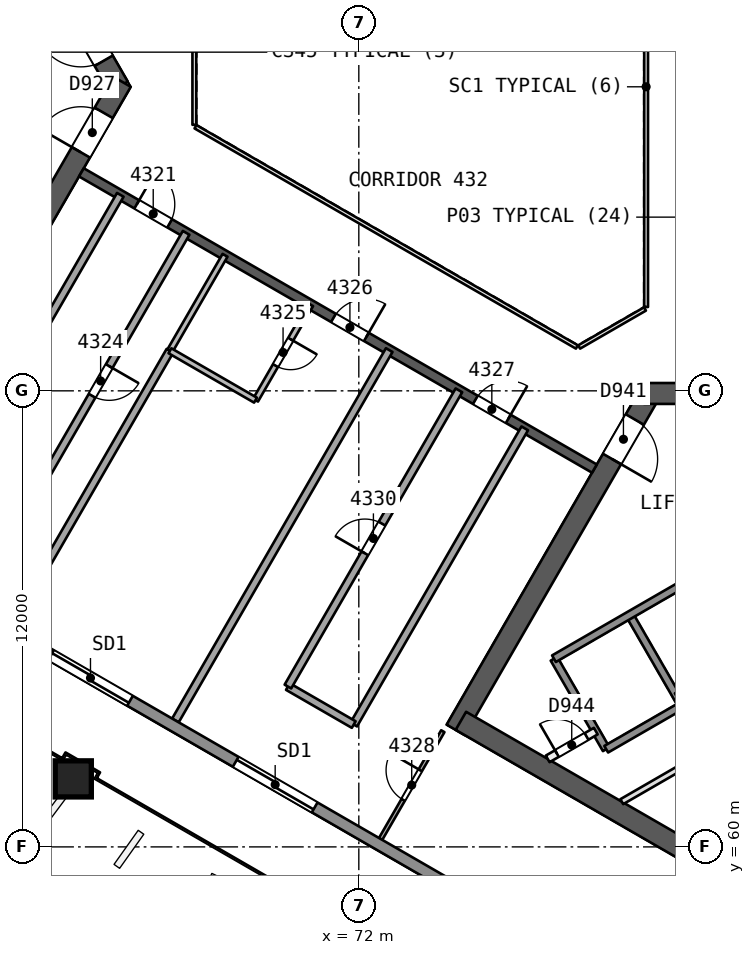
"""IFC4 building model, lengths in metres.
Left out: names, types, materials, properties, quantities, classifications, styles, units other than length and angle.
Written with IfcOpenShell. Run it as: python <this file> out.ifc"""

import sys

from ifc_helpers import new_model, si_unit, direction, frame, frame_2d, origin, origin_2d, place, context, subcontext, project, spatial, rectangle, extrude, element, fill, save


model = new_model("IFC4")
c1 = context("Model", 3, precision=1e-05, world=origin(), true_north=direction((0.0, 1.0)))
c2 = subcontext(c1, "Body", "Model", "MODEL_VIEW")
j1 = project(units=[si_unit("LENGTHUNIT", "METRE"), si_unit("PLANEANGLEUNIT", "RADIAN")], contexts=[c1])
p1 = place(None, origin())
s1 = spatial("IfcSite", under=j1, at=p1, CompositionType="ELEMENT")
p2 = place(p1, origin())
s2 = spatial("IfcBuilding", under=s1, at=p2, CompositionType="ELEMENT")
p3 = place(p2, frame((0.0, 0.0, 178.5)))
s3 = spatial("IfcBuildingStorey", under=s2, at=p3, CompositionType="ELEMENT", Elevation=178.5)
p4 = place(p3, frame((65.682, 80.0, 0.0), z_axis=(0.0, 0.0, 1.0), x_axis=(-0.500000202252, 0.866025287014, 0.0)))
e1 = element("IfcWall", 1, at=p4, inside=s3, PredefinedType="SHEAR", context=c2, shape_type="SweptSolid", body=[
    extrude(rectangle(XDim=10.221, YDim=0.55, at=frame_2d((5.111, 0.0))), origin(), (0.0, 0.0, 1.0), 3.7),
])
p5 = place(p4, frame((0.791, 0.0, 0.0)))
e2 = element("IfcOpeningElement", 2, at=p5, cuts=e1, PredefinedType="OPENING", context=c2, shape_type="SweptSolid", body=[
    extrude(rectangle(XDim=1.2, YDim=2.1, at=frame_2d((0.6, 1.05))), frame((0.0, 0.286, 0.0), z_axis=(0.0, -1.0, 0.0), x_axis=(1.0, 0.0, 0.0)), (0.0, 0.0, 1.0), 0.571),
])
p6 = place(p3, frame((60.709, 71.386, 0.0), z_axis=(0.0, 0.0, 1.0), x_axis=(0.500015938302, 0.866016201606, 0.0)))
e3 = element("IfcWall", 3, at=p6, inside=s3, PredefinedType="SHEAR", context=c2, shape_type="SweptSolid", body=[
    extrude(rectangle(XDim=10.105, YDim=0.55, at=frame_2d((5.053, 0.0))), origin(), (0.0, 0.0, 1.0), 3.7),
])
p7 = place(p6, frame((7.955, 0.0, 0.0)))
e4 = element("IfcOpeningElement", 4, at=p7, cuts=e3, PredefinedType="OPENING", context=c2, shape_type="SweptSolid", body=[
    extrude(rectangle(XDim=1.2, YDim=2.1, at=frame_2d((0.6, 1.05))), frame((0.0, 0.286, 0.0), z_axis=(0.0, -1.0, 0.0), x_axis=(1.0, 0.0, 0.0)), (0.0, 0.0, 1.0), 0.571),
])
p8 = place(p3, frame((79.659, 71.931, 0.0), z_axis=(0.0, 0.0, 1.0), x_axis=(-0.500000202252, -0.866025287014, 0.0)))
e5 = element("IfcWall", 5, at=p8, inside=s3, PredefinedType="SHEAR", context=c2, shape_type="SweptSolid", body=[
    extrude(rectangle(XDim=10.221, YDim=0.55, at=frame_2d((5.111, 0.0))), origin(), (0.0, 0.0, 1.0), 3.7),
])
p9 = place(p8, frame((0.791, 0.0, 0.0)))
e6 = element("IfcOpeningElement", 6, at=p9, cuts=e5, PredefinedType="OPENING", context=c2, shape_type="SweptSolid", body=[
    extrude(rectangle(XDim=1.2, YDim=2.1, at=frame_2d((0.6, 1.05))), frame((0.0, 0.286, 0.0), z_axis=(0.0, -1.0, 0.0), x_axis=(1.0, 0.0, 0.0)), (0.0, 0.0, 1.0), 0.571),
])
p10 = place(p3, frame((74.686, 63.317, 0.0), z_axis=(0.0, 0.0, 1.0), x_axis=(0.866024505738, -0.500001555459, 0.0)))
e7 = element("IfcWall", 7, at=p10, inside=s3, PredefinedType="SHEAR", context=c2, shape_type="SweptSolid", body=[
    extrude(rectangle(XDim=14.059, YDim=0.55, at=frame_2d((7.029, 0.0))), origin(), (0.0, 0.0, 1.0), 3.7),
])
p11 = place(p3, frame((89.605, 71.931, 0.0), z_axis=(0.0, 0.0, 1.0), x_axis=(-1.0, 0.0, 0.0)))
e8 = element("IfcWall", 8, at=p11, inside=s3, PredefinedType="SHEAR", context=c2, shape_type="SweptSolid", body=[
    extrude(rectangle(XDim=10.105, YDim=0.55, at=frame_2d((5.052, 0.0))), origin(), (0.0, 0.0, 1.0), 3.7),
])
p12 = place(p11, frame((7.955, 0.0, 0.0)))
e9 = element("IfcOpeningElement", 9, at=p12, cuts=e8, PredefinedType="OPENING", context=c2, shape_type="SweptSolid", body=[
    extrude(rectangle(XDim=1.2, YDim=2.1, at=frame_2d((0.6, 1.05))), frame((0.0, 0.286, 0.0), z_axis=(0.0, -1.0, 0.0), x_axis=(1.0, 0.0, 0.0)), (0.0, 0.0, 1.0), 0.571),
])
p13 = place(p3, frame((64.7, 77.748, 0.0), z_axis=(0.0, 0.0, 1.0), x_axis=(0.866026492143, -0.499998114903, 0.0)))
e10 = element("IfcWall", 10, at=p13, inside=s3, PredefinedType="SHEAR", context=c2, shape_type="SweptSolid", body=[
    extrude(rectangle(XDim=15.588, YDim=0.25, at=frame_2d((7.794, 0.0))), origin(), (0.0, 0.0, 1.0), 3.25),
])
p14 = place(p13, frame((1.682, 0.0, 0.0)))
e11 = element("IfcOpeningElement", 11, at=p14, cuts=e10, PredefinedType="OPENING", context=c2, shape_type="SweptSolid", body=[
    extrude(rectangle(XDim=1.0, YDim=2.1, at=frame_2d((0.5, 1.05))), frame((0.0, 0.135, 0.0), z_axis=(0.0, -1.0, 0.0), x_axis=(1.0, 0.0, 0.0)), (0.0, 0.0, 1.0), 0.271),
])
p15 = place(p13, frame((7.659, 0.0, 0.0)))
e12 = element("IfcOpeningElement", 12, at=p15, cuts=e10, PredefinedType="OPENING", context=c2, shape_type="SweptSolid", body=[
    extrude(rectangle(XDim=1.0, YDim=2.1, at=frame_2d((0.5, 1.05))), frame((0.0, 0.135, 0.0), z_axis=(0.0, -1.0, 0.0), x_axis=(1.0, 0.0, 0.0)), (0.0, 0.0, 1.0), 0.271),
])
p16 = place(p13, frame((11.971, 0.0, 0.0)))
e13 = element("IfcOpeningElement", 13, at=p16, cuts=e10, PredefinedType="OPENING", context=c2, shape_type="SweptSolid", body=[
    extrude(rectangle(XDim=1.0, YDim=2.1, at=frame_2d((0.5, 1.05))), frame((0.0, 0.135, 0.0), z_axis=(0.0, -1.0, 0.0), x_axis=(1.0, 0.0, 0.0)), (0.0, 0.0, 1.0), 0.271),
])
p17 = place(p3, frame((64.474, 61.769, 0.0), z_axis=(0.010093620709, 0.017482414954, 0.999796221231), x_axis=(-0.866025993948, 0.499998977805, 1.48331e-07)))
e14 = element("IfcColumn", 14, at=p17, inside=s3, PredefinedType="COLUMN", context=c2, shape_type="SweptSolid", body=[
    extrude(rectangle(XDim=0.95, YDim=0.95, at=origin_2d()), origin(), (0.0, 0.0, 1.0), 3.701),
])
p18 = place(p3, frame((67.456, 76.157, 0.0), z_axis=(0.0, 0.0, 1.0), x_axis=(-0.499990139034, -0.866031096941, 0.0)))
e15 = element("IfcWall", 15, at=p18, inside=s3, PredefinedType="PARTITIONING", context=c2, shape_type="SweptSolid", body=[
    extrude(rectangle(XDim=9.0, YDim=0.2, at=frame_2d((4.5, 0.0))), origin(), (0.0, 0.0, 1.0), 3.25),
])
p19 = place(p18, frame((4.05, 0.0, 0.0)))
e16 = element("IfcOpeningElement", 16, at=p19, cuts=e15, PredefinedType="OPENING", context=c2, shape_type="SweptSolid", body=[
    extrude(rectangle(XDim=0.9, YDim=2.1, at=frame_2d((0.45, 1.05))), frame((0.0, 0.11, 0.0), z_axis=(0.0, -1.0, 0.0), x_axis=(1.0, 0.0, 0.0)), (0.0, 0.0, 1.0), 0.221),
])
p20 = place(p3, frame((61.224, 69.363, 0.0), z_axis=(0.0, 0.0, 1.0), x_axis=(0.499990139034, 0.866031096941, 0.0)))
e17 = element("IfcWall", 17, at=p20, inside=s3, PredefinedType="PARTITIONING", context=c2, shape_type="SweptSolid", body=[
    extrude(rectangle(XDim=9.0, YDim=0.2, at=frame_2d((4.5, 0.0))), origin(), (0.0, 0.0, 1.0), 3.25),
])
p21 = place(p3, frame((62.854, 65.821, 0.0), z_axis=(0.0, 0.0, 1.0), x_axis=(0.500002444709, 0.866023992326, 0.0)))
e18 = element("IfcWall", 18, at=p21, inside=s3, PredefinedType="PARTITIONING", context=c2, shape_type="SweptSolid", body=[
    extrude(rectangle(XDim=8.353, YDim=0.2, at=frame_2d((4.177, 0.0))), origin(), (0.0, 0.0, 1.0), 3.25),
])
p22 = place(p3, frame((67.03, 73.054, 0.0), z_axis=(0.0, 0.0, 1.0), x_axis=(0.499987231761, 0.866032775405, 0.0)))
e19 = element("IfcWall", 19, at=p22, inside=s3, PredefinedType="PARTITIONING", context=c2, shape_type="SweptSolid", body=[
    extrude(rectangle(XDim=2.9, YDim=0.15, at=frame_2d((1.45, 0.0))), origin(), (0.0, 0.0, 1.0), 3.25),
])
p23 = place(p3, frame((70.732, 74.266, 0.0), z_axis=(0.0, 0.0, 1.0), x_axis=(-0.499987231761, -0.866032775405, 0.0)))
e20 = element("IfcWall", 20, at=p23, inside=s3, PredefinedType="PARTITIONING", context=c2, shape_type="SweptSolid", body=[
    extrude(rectangle(XDim=2.9, YDim=0.15, at=frame_2d((1.45, 0.0))), origin(), (0.0, 0.0, 1.0), 3.25),
])
p24 = place(p23, frame((1.05, 0.0, 0.0)))
e21 = element("IfcOpeningElement", 21, at=p24, cuts=e20, PredefinedType="OPENING", context=c2, shape_type="SweptSolid", body=[
    extrude(rectangle(XDim=0.8, YDim=2.1, at=frame_2d((0.4, 1.05))), frame((0.0, 0.085, 0.0), z_axis=(0.0, -1.0, 0.0), x_axis=(1.0, 0.0, 0.0)), (0.0, 0.0, 1.0), 0.171),
])
p25 = place(p3, frame((69.282, 71.754, 0.0), z_axis=(0.0, 0.0, 1.0), x_axis=(-0.866021400173, 0.500006934395, 0.0)))
e22 = element("IfcWall", 22, at=p25, inside=s3, PredefinedType="PARTITIONING", context=c2, shape_type="SweptSolid", body=[
    extrude(rectangle(XDim=2.6, YDim=0.15, at=frame_2d((1.3, 0.0))), origin(), (0.0, 0.0, 1.0), 3.25),
])
p26 = place(p3, frame((67.174, 63.326, 0.0), z_axis=(0.0, 0.0, 1.0), x_axis=(0.499998524228, 0.86602625582, 0.0)))
e23 = element("IfcWall", 23, at=p26, inside=s3, PredefinedType="PARTITIONING", context=c2, shape_type="SweptSolid", body=[
    extrude(rectangle(XDim=11.253, YDim=0.2, at=frame_2d((5.626, 0.0))), origin(), (0.0, 0.0, 1.0), 3.25),
])
p27 = place(p3, frame((72.573, 60.209, 0.0), z_axis=(0.0, 0.0, 1.0), x_axis=(0.499980647919, 0.866036576425, 0.0)))
e24 = element("IfcWall", 24, at=p27, inside=s3, PredefinedType="PARTITIONING", context=c2, shape_type="SweptSolid", body=[
    extrude(rectangle(XDim=3.274, YDim=0.1, at=frame_2d((1.637, 0.0))), origin(), (0.0, 0.0, 1.0), 3.25),
])
p28 = place(p27, frame((1.187, 0.0, 0.0)))
e25 = element("IfcOpeningElement", 25, at=p28, cuts=e24, PredefinedType="OPENING", context=c2, shape_type="SweptSolid", body=[
    extrude(rectangle(XDim=0.9, YDim=2.1, at=frame_2d((0.45, 1.05))), frame((0.0, 0.061, 0.0), z_axis=(0.0, -1.0, 0.0), x_axis=(1.0, 0.0, 0.0)), (0.0, 0.0, 1.0), 0.121),
])
p29 = place(p3, frame((76.366, 71.013, 0.0), z_axis=(0.0, 0.0, 1.0), x_axis=(-0.5000018851, -0.866024315419, 0.0)))
e26 = element("IfcWall", 26, at=p29, inside=s3, PredefinedType="PARTITIONING", context=c2, shape_type="SweptSolid", body=[
    extrude(rectangle(XDim=9.0, YDim=0.2, at=frame_2d((4.5, 0.0))), origin(), (0.0, 0.0, 1.0), 3.25),
])
p30 = place(p3, frame((71.866, 63.219, 0.0), z_axis=(0.0, 0.0, 1.0), x_axis=(-0.866010750942, 0.50002537861, 0.0)))
e27 = element("IfcWall", 27, at=p30, inside=s3, PredefinedType="PARTITIONING", context=c2, shape_type="SweptSolid", body=[
    extrude(rectangle(XDim=2.0, YDim=0.2, at=frame_2d((1.0, 0.0))), origin(), (0.0, 0.0, 1.0), 3.25),
])
p31 = place(p3, frame((70.134, 64.219, 0.0), z_axis=(0.0, 0.0, 1.0), x_axis=(0.5000018851, 0.866024315419, 0.0)))
e28 = element("IfcWall", 28, at=p31, inside=s3, PredefinedType="PARTITIONING", context=c2, shape_type="SweptSolid", body=[
    extrude(rectangle(XDim=9.0, YDim=0.2, at=frame_2d((4.5, 0.0))), origin(), (0.0, 0.0, 1.0), 3.25),
])
p32 = place(p31, frame((4.05, 0.0, 0.0)))
e29 = element("IfcOpeningElement", 29, at=p32, cuts=e28, PredefinedType="OPENING", context=c2, shape_type="SweptSolid", body=[
    extrude(rectangle(XDim=0.9, YDim=2.1, at=frame_2d((0.45, 1.05))), frame((0.0, 0.11, 0.0), z_axis=(0.0, -1.0, 0.0), x_axis=(1.0, 0.0, 0.0)), (0.0, 0.0, 1.0), 0.221),
])
p33 = place(p3, frame((88.788, 50.676, 0.0), z_axis=(0.0, 0.0, 1.0), x_axis=(-0.866026647012, 0.499997846661, 0.0)))
e30 = element("IfcWall", 30, at=p33, inside=s3, PredefinedType="SOLIDWALL", context=c2, shape_type="SweptSolid", body=[
    extrude(rectangle(XDim=53.206, YDim=0.3, at=frame_2d((26.603, 0.0))), origin(), (0.0, 0.0, 1.0), 3.25),
])
p34 = place(p33, frame((31.015, 0.0, 0.0)))
e31 = element("IfcOpeningElement", 31, at=p34, cuts=e30, PredefinedType="OPENING", context=c2, shape_type="SweptSolid", body=[
    extrude(rectangle(XDim=2.4, YDim=2.4, at=frame_2d((1.2, 1.2))), frame((0.0, 0.161, 0.0), z_axis=(0.0, -1.0, 0.0), x_axis=(1.0, 0.0, 0.0)), (0.0, 0.0, 1.0), 0.321),
])
p35 = place(p33, frame((41.356, 0.0, 0.0)))
e32 = element("IfcOpeningElement", 32, at=p35, cuts=e30, PredefinedType="OPENING", context=c2, shape_type="SweptSolid", body=[
    extrude(rectangle(XDim=2.4, YDim=2.4, at=frame_2d((1.2, 1.2))), frame((0.0, 0.161, 0.0), z_axis=(0.0, -1.0, 0.0), x_axis=(1.0, 0.0, 0.0)), (0.0, 0.0, 1.0), 0.321),
])
p36 = place(p33, frame((20.726, 0.0, 0.0)))
e33 = element("IfcOpeningElement", 33, at=p36, cuts=e30, PredefinedType="OPENING", context=c2, shape_type="SweptSolid", body=[
    extrude(rectangle(XDim=2.4, YDim=2.4, at=frame_2d((1.2, 1.2))), frame((0.0, 0.161, 0.0), z_axis=(0.0, -1.0, 0.0), x_axis=(1.0, 0.0, 0.0)), (0.0, 0.0, 1.0), 0.321),
])
p37 = place(p33, frame((9.4, 0.0, 0.0)))
e34 = element("IfcOpeningElement", 34, at=p37, cuts=e30, PredefinedType="OPENING", context=c2, shape_type="SweptSolid", body=[
    extrude(rectangle(XDim=2.4, YDim=2.4, at=frame_2d((1.2, 1.2))), frame((0.0, 0.161, 0.0), z_axis=(0.0, -1.0, 0.0), x_axis=(1.0, 0.0, 0.0)), (0.0, 0.0, 1.0), 0.321),
])
p38 = place(p33, frame((26.338, 0.0, 0.0)))
e35 = element("IfcOpeningElement", 35, at=p38, cuts=e30, PredefinedType="OPENING", context=c2, shape_type="SweptSolid", body=[
    extrude(rectangle(XDim=2.4, YDim=2.4, at=frame_2d((1.2, 1.2))), frame((0.0, 0.161, 0.0), z_axis=(0.0, -1.0, 0.0), x_axis=(1.0, 0.0, 0.0)), (0.0, 0.0, 1.0), 0.321),
])
for number, where, z_axis, x_axis in (
    (36, (77.135, 64.952, 0.0), (0.0, 0.0, 1.0), (0.5, -0.866, 0.0)),
    (37, (79.127, 66.102, 0.0), (0.0, 0.0, 1.0), (0.5, -0.866, 0.0)),
):
    element("IfcWall", number, at=place(p3, frame(where, z_axis=z_axis, x_axis=x_axis)), inside=s3, PredefinedType="SOLIDWALL", context=c2, shape_type="SweptSolid", body=[
        extrude(rectangle(XDim=2.75, YDim=0.2, at=frame_2d((1.375, 0.0))), origin(), (0.0, 0.0, 1.0), 3.25),
    ])
p39 = place(p3, frame((77.135, 64.952, 0.0), z_axis=(0.0, 0.0, 1.0), x_axis=(0.866031916153, 0.499988720078, 0.0)))
e38 = element("IfcWall", 38, at=p39, inside=s3, PredefinedType="SOLIDWALL", context=c2, shape_type="SweptSolid", body=[
    extrude(rectangle(XDim=11.35, YDim=0.2, at=frame_2d((5.675, 0.0))), origin(), (0.0, 0.0, 1.0), 3.25),
])
p40 = place(p3, frame((76.97, 62.316, 0.0), z_axis=(0.0, 0.0, 1.0), x_axis=(0.865982457891, 0.500074377092, 0.0)))
e39 = element("IfcWall", 39, at=p40, inside=s3, PredefinedType="PARTITIONING", context=c2, shape_type="SweptSolid", body=[
    extrude(rectangle(XDim=1.461, YDim=0.2, at=frame_2d((0.73, 0.0))), origin(), (0.0, 0.0, 1.0), 3.25),
])
p41 = place(p40, frame((0.281, 0.0, 0.0)))
e40 = element("IfcOpeningElement", 40, at=p41, cuts=e39, PredefinedType="OPENING", context=c2, shape_type="SweptSolid", body=[
    extrude(rectangle(XDim=0.9, YDim=2.1, at=frame_2d((0.45, 1.05))), frame((0.0, 0.11, 0.0), z_axis=(0.0, -1.0, 0.0), x_axis=(1.0, 0.0, 0.0)), (0.0, 0.0, 1.0), 0.221),
])
p42 = place(p3, frame((80.367, 63.954, 0.0), z_axis=(0.0, 0.0, 1.0), x_axis=(0.866026575979, 0.499997969693, 0.0)))
e41 = element("IfcWall", 41, at=p42, inside=s3, PredefinedType="SOLIDWALL", context=c2, shape_type="SweptSolid", body=[
    extrude(rectangle(XDim=6.75, YDim=0.2, at=frame_2d((3.375, 0.0))), origin(), (0.0, 0.0, 1.0), 3.25),
])
p43 = place(p3, frame((78.51, 62.57, 0.0), z_axis=(0.0, 0.0, 1.0), x_axis=(0.866053019151, 0.499952165731, 0.0)))
e42 = element("IfcWall", 42, at=p43, inside=s3, PredefinedType="SOLIDWALL", context=c2, shape_type="SweptSolid", body=[
    extrude(rectangle(XDim=2.3, YDim=0.2, at=frame_2d((1.15, 0.0))), origin(), (0.0, 0.0, 1.0), 3.25),
])
p44 = place(p3, frame((78.92, 61.19, 0.0), z_axis=(0.0, 0.0, 1.0), x_axis=(0.866038211682, 0.499977815414, 0.0)))
e43 = element("IfcWall", 43, at=p44, inside=s3, PredefinedType="PARTITIONING", context=c2, shape_type="SweptSolid", body=[
    extrude(rectangle(XDim=2.51, YDim=0.15, at=frame_2d((1.255, 0.0))), origin(), (0.0, 0.0, 1.0), 3.25),
])
p45 = place(p3, frame((79.56, 74.206, 0.0), z_axis=(0.0, 0.0, 1.0), x_axis=(0.0, 1.0, 0.0)))
e44 = element("IfcWall", 44, at=p45, inside=s3, PredefinedType="PARTITIONING", context=c2, shape_type="SweptSolid", body=[
    extrude(rectangle(XDim=11.588, YDim=0.1, at=frame_2d((5.794, 0.0))), origin(), (0.0, 0.0, 1.0), 3.25),
])
p46 = place(p3, frame((67.672, 81.0, 0.0), z_axis=(0.0, 0.0, 1.0), x_axis=(0.0, -1.0, 0.0)))
e45 = element("IfcWall", 45, at=p46, inside=s3, PredefinedType="PARTITIONING", context=c2, shape_type="SweptSolid", body=[
    extrude(rectangle(XDim=2.0, YDim=0.1, at=frame_2d((1.0, 0.0))), origin(), (0.0, 0.0, 1.0), 3.25),
])
p47 = place(p3, frame((67.702, 78.948, 0.0), z_axis=(0.0, 0.0, 1.0), x_axis=(0.866026658274, -0.499997827154, 0.0)))
e46 = element("IfcWall", 46, at=p47, inside=s3, PredefinedType="PARTITIONING", context=c2, shape_type="SweptSolid", body=[
    extrude(rectangle(XDim=11.588, YDim=0.1, at=frame_2d((5.794, 0.0))), origin(), (0.0, 0.0, 1.0), 3.25),
])
p48 = place(p3, frame((77.798, 73.154, 0.0), z_axis=(0.0, 0.0, 1.0), x_axis=(0.866041268327, 0.499972520799, 0.0)))
e47 = element("IfcWall", 47, at=p48, inside=s3, PredefinedType="PARTITIONING", context=c2, shape_type="SweptSolid", body=[
    extrude(rectangle(XDim=2.0, YDim=0.1, at=frame_2d((1.0, 0.0))), origin(), (0.0, 0.0, 1.0), 3.25),
])
p49 = place(p14, origin())
e48 = element("IfcDoor", 48, at=p49, inside=s3, OperationType="SINGLE_SWING_LEFT", PredefinedType="NOTDEFINED", context=c2, shape_type="SweptSolid", body=[
    extrude(rectangle(XDim=1.0, YDim=2.1, at=frame_2d((0.5, 1.05))), frame((0.0, 0.025, 0.0), z_axis=(0.0, -1.0, 0.0), x_axis=(1.0, 0.0, 0.0)), (0.0, 0.0, 1.0), 0.05),
])
fill(e11, e48)
p50 = place(p19, origin())
e49 = element("IfcDoor", 49, at=p50, inside=s3, OperationType="SINGLE_SWING_LEFT", PredefinedType="NOTDEFINED", context=c2, shape_type="SweptSolid", body=[
    extrude(rectangle(XDim=0.9, YDim=2.1, at=frame_2d((0.45, 1.05))), frame((0.0, 0.025, 0.0), z_axis=(0.0, -1.0, 0.0), x_axis=(1.0, 0.0, 0.0)), (0.0, 0.0, 1.0), 0.05),
])
fill(e16, e49)
p51 = place(p24, origin())
e50 = element("IfcDoor", 50, at=p51, inside=s3, OperationType="SINGLE_SWING_LEFT", PredefinedType="NOTDEFINED", context=c2, shape_type="SweptSolid", body=[
    extrude(rectangle(XDim=0.8, YDim=2.1, at=frame_2d((0.4, 1.05))), frame((0.0, 0.025, 0.0), z_axis=(0.0, -1.0, 0.0), x_axis=(1.0, 0.0, 0.0)), (0.0, 0.0, 1.0), 0.05),
])
fill(e21, e50)
p52 = place(p15, origin())
e51 = element("IfcDoor", 51, at=p52, inside=s3, OperationType="SINGLE_SWING_RIGHT", PredefinedType="NOTDEFINED", context=c2, shape_type="SweptSolid", body=[
    extrude(rectangle(XDim=1.0, YDim=2.1, at=frame_2d((0.5, 1.05))), frame((0.0, 0.025, 0.0), z_axis=(0.0, -1.0, 0.0), x_axis=(1.0, 0.0, 0.0)), (0.0, 0.0, 1.0), 0.05),
])
fill(e12, e51)
p53 = place(p16, origin())
e52 = element("IfcDoor", 52, at=p53, inside=s3, OperationType="SINGLE_SWING_RIGHT", PredefinedType="NOTDEFINED", context=c2, shape_type="SweptSolid", body=[
    extrude(rectangle(XDim=1.0, YDim=2.1, at=frame_2d((0.5, 1.05))), frame((0.0, 0.025, 0.0), z_axis=(0.0, -1.0, 0.0), x_axis=(1.0, 0.0, 0.0)), (0.0, 0.0, 1.0), 0.05),
])
fill(e13, e52)
p54 = place(p28, origin())
e53 = element("IfcDoor", 53, at=p54, inside=s3, OperationType="SINGLE_SWING_RIGHT", PredefinedType="NOTDEFINED", context=c2, shape_type="SweptSolid", body=[
    extrude(rectangle(XDim=0.9, YDim=2.1, at=frame_2d((0.45, 1.05))), frame((0.0, 0.025, 0.0), z_axis=(0.0, -1.0, 0.0), x_axis=(1.0, 0.0, 0.0)), (0.0, 0.0, 1.0), 0.05),
])
fill(e25, e53)
p55 = place(p32, origin())
e54 = element("IfcDoor", 54, at=p55, inside=s3, OperationType="SINGLE_SWING_LEFT", PredefinedType="NOTDEFINED", context=c2, shape_type="SweptSolid", body=[
    extrude(rectangle(XDim=0.9, YDim=2.1, at=frame_2d((0.45, 1.05))), frame((0.0, 0.025, 0.0), z_axis=(0.0, -1.0, 0.0), x_axis=(1.0, 0.0, 0.0)), (0.0, 0.0, 1.0), 0.05),
])
fill(e29, e54)
p56 = place(p36, origin())
e55 = element("IfcDoor", 55, at=p56, inside=s3, OperationType="SLIDING_TO_LEFT", PredefinedType="NOTDEFINED", context=c2, shape_type="SweptSolid", body=[
    extrude(rectangle(XDim=2.4, YDim=2.4, at=frame_2d((1.2, 1.2))), frame((0.0, 0.025, 0.0), z_axis=(0.0, -1.0, 0.0), x_axis=(1.0, 0.0, 0.0)), (0.0, 0.0, 1.0), 0.05),
])
fill(e33, e55)
p57 = place(p38, origin())
e56 = element("IfcDoor", 56, at=p57, inside=s3, OperationType="SLIDING_TO_LEFT", PredefinedType="NOTDEFINED", context=c2, shape_type="SweptSolid", body=[
    extrude(rectangle(XDim=2.4, YDim=2.4, at=frame_2d((1.2, 1.2))), frame((0.0, 0.025, 0.0), z_axis=(0.0, -1.0, 0.0), x_axis=(1.0, 0.0, 0.0)), (0.0, 0.0, 1.0), 0.05),
])
fill(e35, e56)
p58 = place(p5, origin())
e57 = element("IfcDoor", 57, at=p58, inside=s3, OperationType="SINGLE_SWING_RIGHT", PredefinedType="NOTDEFINED", context=c2, shape_type="SweptSolid", body=[
    extrude(rectangle(XDim=1.2, YDim=2.1, at=frame_2d((0.6, 1.05))), frame((0.0, 0.025, 0.0), z_axis=(0.0, -1.0, 0.0), x_axis=(1.0, 0.0, 0.0)), (0.0, 0.0, 1.0), 0.05),
])
fill(e2, e57)
p59 = place(p7, origin())
e58 = element("IfcDoor", 58, at=p59, inside=s3, OperationType="SINGLE_SWING_LEFT", PredefinedType="NOTDEFINED", context=c2, shape_type="SweptSolid", body=[
    extrude(rectangle(XDim=1.2, YDim=2.1, at=frame_2d((0.6, 1.05))), frame((0.0, 0.025, 0.0), z_axis=(0.0, -1.0, 0.0), x_axis=(1.0, 0.0, 0.0)), (0.0, 0.0, 1.0), 0.05),
])
fill(e4, e58)
p60 = place(p9, origin())
e59 = element("IfcDoor", 59, at=p60, inside=s3, OperationType="SINGLE_SWING_RIGHT", PredefinedType="NOTDEFINED", context=c2, shape_type="SweptSolid", body=[
    extrude(rectangle(XDim=1.2, YDim=2.1, at=frame_2d((0.6, 1.05))), frame((0.0, 0.025, 0.0), z_axis=(0.0, -1.0, 0.0), x_axis=(1.0, 0.0, 0.0)), (0.0, 0.0, 1.0), 0.05),
])
fill(e6, e59)
p61 = place(p41, origin())
e60 = element("IfcDoor", 60, at=p61, inside=s3, OperationType="SINGLE_SWING_LEFT", PredefinedType="NOTDEFINED", context=c2, shape_type="SweptSolid", body=[
    extrude(rectangle(XDim=0.9, YDim=2.1, at=frame_2d((0.45, 1.05))), frame((0.0, 0.025, 0.0), z_axis=(0.0, -1.0, 0.0), x_axis=(1.0, 0.0, 0.0)), (0.0, 0.0, 1.0), 0.05),
])
fill(e40, e60)
save(model, sys.argv[1])
